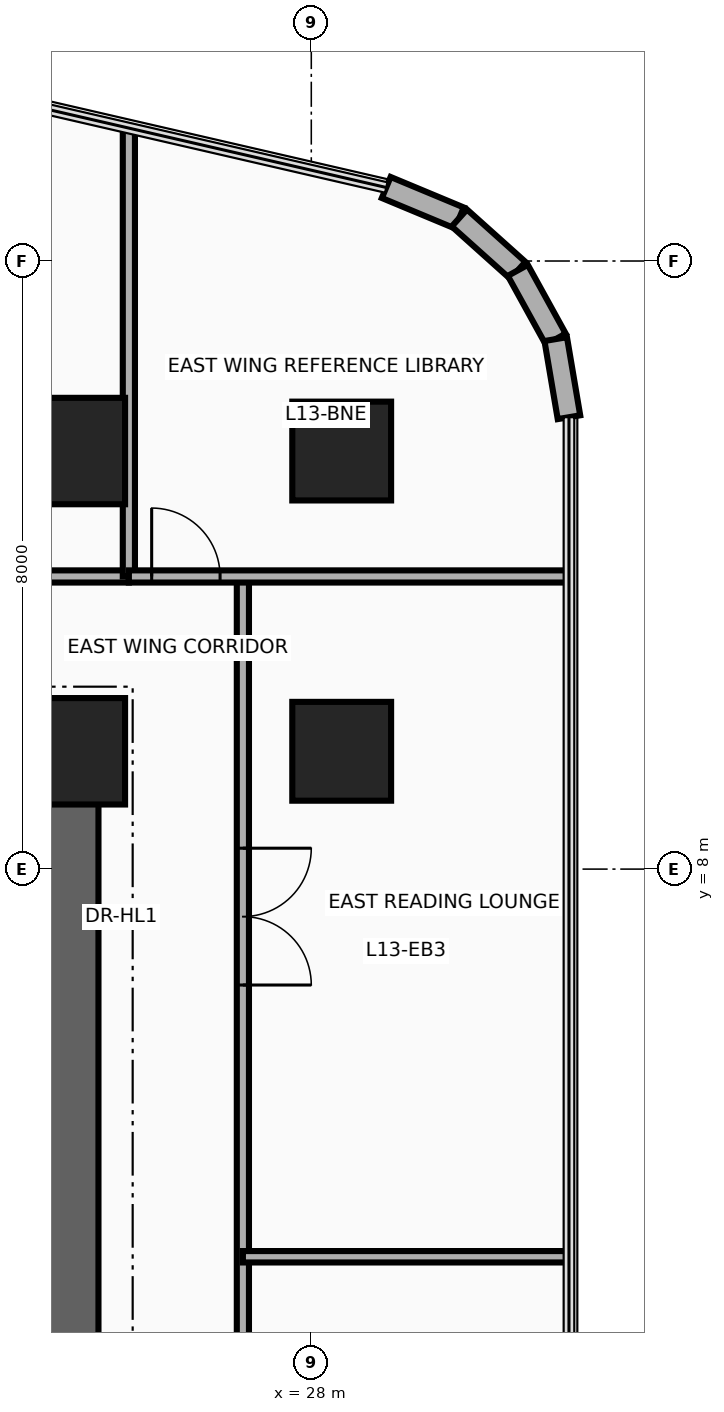
"""IFC4 building model, lengths in metres.
Left out: names, types, materials, properties, quantities, classifications, styles, units other than length and angle.
Written with IfcOpenShell. Run it as: python <this file> out.ifc"""

import sys

from ifc_helpers import new_model, si_unit, direction, frame, frame_2d, origin, origin_2d, place, context, subcontext, project, spatial, rectangle, circle, extrude, source, transform, mapped, element, fill, save


model = new_model("IFC4")
c1 = context("Model", 3, precision=1e-05, world=origin(), true_north=direction((0.0, 1.0)))
c2 = subcontext(c1, "Body", "Model", "MODEL_VIEW")
j1 = project(units=[si_unit("LENGTHUNIT", "METRE"), si_unit("PLANEANGLEUNIT", "RADIAN")], contexts=[c1])
p1 = place(None, origin())
s1 = spatial("IfcSite", under=j1, at=p1, CompositionType="ELEMENT")
p2 = place(p1, origin())
s2 = spatial("IfcBuilding", under=s1, at=p2, CompositionType="ELEMENT")
p3 = place(p2, frame((0.0, 0.0, 55.6)))
s3 = spatial("IfcBuildingStorey", under=s2, at=p3, CompositionType="ELEMENT", Elevation=55.6)
p4 = place(p3, frame((24.85, 0.95, 0.0), z_axis=(0.0, 0.0, 1.0), x_axis=(0.0, 1.0, 0.0)))
e1 = element("IfcWall", 1, at=p4, inside=s3, PredefinedType="SHEAR", context=c2, shape_type="SweptSolid", body=[
    extrude(rectangle(XDim=8.95, YDim=0.7, at=frame_2d((4.475, 0.0))), origin(), (0.0, 0.0, 1.0), 3.46),
])
p5 = place(p3, frame((15.85, 9.55, 0.0), z_axis=(0.0, 0.0, 1.0), x_axis=(1.0, 0.0, 0.0)))
e2 = element("IfcWall", 2, at=p5, inside=s3, PredefinedType="SHEAR", context=c2, shape_type="SweptSolid", body=[
    extrude(rectangle(XDim=9.0, YDim=0.7, at=frame_2d((4.5, 0.0))), origin(), (0.0, 0.0, 1.0), 3.46),
])
m1 = source(origin(), c2, "Body", "SweptSolid", [
    extrude(rectangle(XDim=1.4, YDim=1.4, at=origin_2d()), origin(), (0.0, 0.0, 1.0), 3.7),
])
p6 = place(p3, frame((24.85, 9.55, 0.0), z_axis=(0.0, 0.0, 1.0), x_axis=(1.0, 0.0, 0.0)))
e3 = element("IfcColumn", 3, at=p6, inside=s3, PredefinedType="COLUMN", context=c2, shape_type="MappedRepresentation", body=[
    mapped(m1, transform((0.0, 0.0, 0.0), x_axis=(1.0, 0.0, 0.0), y_axis=(0.0, 1.0, 0.0), z_axis=(0.0, 0.0, 1.0), scale=1.0)),
])
m2 = source(origin(), c2, "Body", "SweptSolid", [
    extrude(circle(Radius=0.65, at=origin_2d()), origin(), (0.0, 0.0, 1.0), 3.7),
])
p7 = place(p3, frame((28.4, 9.55, 0.0), z_axis=(0.0, 0.0, 1.0), x_axis=(1.0, 0.0, 0.0)))
e4 = element("IfcColumn", 4, at=p7, inside=s3, PredefinedType="COLUMN", context=c2, shape_type="MappedRepresentation", body=[
    mapped(m2, transform((0.0, 0.0, 0.0), x_axis=(1.0, 0.0, 0.0), y_axis=(0.0, 1.0, 0.0), z_axis=(0.0, 0.0, 1.0), scale=1.0)),
])
p8 = place(p3, frame((24.85, 13.5, 0.0), z_axis=(0.0, 0.0, 1.0), x_axis=(1.0, 0.0, 0.0)))
e5 = element("IfcColumn", 5, at=p8, inside=s3, PredefinedType="COLUMN", context=c2, shape_type="MappedRepresentation", body=[
    mapped(m1, transform((0.0, 0.0, 0.0), x_axis=(1.0, 0.0, 0.0), y_axis=(0.0, 1.0, 0.0), z_axis=(0.0, 0.0, 1.0), scale=1.0)),
])
p9 = place(p3, frame((28.4, 13.5, 0.0), z_axis=(0.0, 0.0, 1.0), x_axis=(1.0, 0.0, 0.0)))
e6 = element("IfcColumn", 6, at=p9, inside=s3, PredefinedType="COLUMN", context=c2, shape_type="MappedRepresentation", body=[
    mapped(m2, transform((0.0, 0.0, 0.0), x_axis=(1.0, 0.0, 0.0), y_axis=(0.0, 1.0, 0.0), z_axis=(0.0, 0.0, 1.0), scale=1.0)),
])
p10 = place(p3, frame((28.986, 16.967, 0.0), z_axis=(0.0, 0.0, 1.0), x_axis=(0.923083852684, -0.384598753136, 0.0)))
e7 = element("IfcWall", 7, at=p10, inside=s3, PredefinedType="SOLIDWALL", context=c2, shape_type="SweptSolid", body=[
    extrude(rectangle(XDim=1.042, YDim=0.3, at=frame_2d((0.521, 0.0))), origin(), (0.0, 0.0, 1.0), 3.46),
])
p11 = place(p3, frame((29.948, 16.566, 0.0), z_axis=(0.0, 0.0, 1.0), x_axis=(0.744585645533, -0.66752694063, 0.0)))
e8 = element("IfcWall", 8, at=p11, inside=s3, PredefinedType="SOLIDWALL", context=c2, shape_type="SweptSolid", body=[
    extrude(rectangle(XDim=1.033, YDim=0.3, at=frame_2d((0.517, 0.0))), origin(), (0.0, 0.0, 1.0), 3.46),
])
p12 = place(p3, frame((30.717, 15.877, 0.0), z_axis=(0.0, 0.0, 1.0), x_axis=(0.482971098131, -0.875636293429, 0.0)))
e9 = element("IfcWall", 9, at=p12, inside=s3, PredefinedType="SOLIDWALL", context=c2, shape_type="SweptSolid", body=[
    extrude(rectangle(XDim=1.033, YDim=0.3, at=frame_2d((0.516, 0.0))), origin(), (0.0, 0.0, 1.0), 3.46),
])
p13 = place(p3, frame((31.216, 14.973, 0.0), z_axis=(0.0, 0.0, 1.0), x_axis=(0.167019462117, -0.985953598946, 0.0)))
e10 = element("IfcWall", 10, at=p13, inside=s3, PredefinedType="SOLIDWALL", context=c2, shape_type="SweptSolid", body=[
    extrude(rectangle(XDim=1.042, YDim=0.3, at=frame_2d((0.521, 0.0))), origin(), (0.0, 0.0, 1.0), 3.46),
])
p14 = place(p3, frame((15.4, 11.85, 0.0), z_axis=(0.0, 0.0, 1.0), x_axis=(1.0, 0.0, 0.0)))
e11 = element("IfcWall", 11, at=p14, inside=s3, PredefinedType="PARTITIONING", context=c2, shape_type="SweptSolid", body=[
    extrude(rectangle(XDim=10.2, YDim=0.16, at=frame_2d((5.1, 0.0))), origin(), (0.0, 0.0, 1.0), 2.834),
])
p15 = place(p14, frame((4.65, 0.0, 0.0)))
e12 = element("IfcOpeningElement", 12, at=p15, cuts=e11, PredefinedType="OPENING", context=c2, shape_type="SweptSolid", body=[
    extrude(rectangle(XDim=0.9, YDim=2.1, at=frame_2d((0.45, 1.05))), frame((0.0, 0.095, 0.0), z_axis=(0.0, -1.0, 0.0), x_axis=(1.0, 0.0, 0.0)), (0.0, 0.0, 1.0), 0.19),
])
p16 = place(p3, frame((25.6, 11.85, 0.0), z_axis=(0.0, 0.0, 1.0), x_axis=(0.0, 1.0, 0.0)))
e13 = element("IfcWall", 13, at=p16, inside=s3, PredefinedType="PARTITIONING", context=c2, shape_type="SweptSolid", body=[
    extrude(rectangle(XDim=5.898, YDim=0.16, at=frame_2d((2.949, 0.0))), origin(), (0.0, 0.0, 1.0), 2.583),
])
p17 = place(p3, frame((27.1, -13.89, 0.0), z_axis=(0.0, 0.0, 1.0), x_axis=(0.0, 1.0, 0.0)))
e14 = element("IfcWall", 14, at=p17, inside=s3, PredefinedType="PARTITIONING", context=c2, shape_type="SweptSolid", body=[
    extrude(rectangle(XDim=25.74, YDim=0.16, at=frame_2d((12.87, 0.0))), origin(), (0.0, 0.0, 1.0), 2.583),
])
p18 = place(p17, frame((1.76, 0.0, 0.0)))
e15 = element("IfcOpeningElement", 15, at=p18, cuts=e14, PredefinedType="OPENING", context=c2, shape_type="SweptSolid", body=[
    extrude(rectangle(XDim=1.8, YDim=2.15, at=frame_2d((0.9, 1.075))), frame((0.0, 0.095, 0.0), z_axis=(0.0, -1.0, 0.0), x_axis=(1.0, 0.0, 0.0)), (0.0, 0.0, 1.0), 0.19),
])
p19 = place(p17, frame((12.16, 0.0, 0.0)))
e16 = element("IfcOpeningElement", 16, at=p19, cuts=e14, PredefinedType="OPENING", context=c2, shape_type="SweptSolid", body=[
    extrude(rectangle(XDim=1.8, YDim=2.15, at=frame_2d((0.9, 1.075))), frame((0.0, 0.095, 0.0), z_axis=(0.0, -1.0, 0.0), x_axis=(1.0, 0.0, 0.0)), (0.0, 0.0, 1.0), 0.19),
])
p20 = place(p17, frame((20.365, 0.0, 0.0)))
e17 = element("IfcOpeningElement", 17, at=p20, cuts=e14, PredefinedType="OPENING", context=c2, shape_type="SweptSolid", body=[
    extrude(rectangle(XDim=1.8, YDim=2.15, at=frame_2d((0.9, 1.075))), frame((0.0, 0.095, 0.0), z_axis=(0.0, -1.0, 0.0), x_axis=(1.0, 0.0, 0.0)), (0.0, 0.0, 1.0), 0.19),
])
p21 = place(p3, frame((25.6, 11.85, 0.0), z_axis=(0.0, 0.0, 1.0), x_axis=(1.0, 0.0, 0.0)))
e18 = element("IfcWall", 18, at=p21, inside=s3, PredefinedType="PARTITIONING", context=c2, shape_type="SweptSolid", body=[
    extrude(rectangle(XDim=5.79, YDim=0.16, at=frame_2d((2.895, 0.0))), origin(), (0.0, 0.0, 1.0), 2.896),
])
p22 = place(p21, frame((0.3, 0.0, 0.0)))
e19 = element("IfcOpeningElement", 19, at=p22, cuts=e18, PredefinedType="OPENING", context=c2, shape_type="SweptSolid", body=[
    extrude(rectangle(XDim=0.9, YDim=2.1, at=frame_2d((0.45, 1.05))), frame((0.0, 0.095, 0.0), z_axis=(0.0, -1.0, 0.0), x_axis=(1.0, 0.0, 0.0)), (0.0, 0.0, 1.0), 0.19),
])
p23 = place(p3, frame((27.1, 2.9, 0.0), z_axis=(0.0, 0.0, 1.0), x_axis=(1.0, 0.0, 0.0)))
e20 = element("IfcWall", 20, at=p23, inside=s3, PredefinedType="PARTITIONING", context=c2, shape_type="SweptSolid", body=[
    extrude(rectangle(XDim=4.29, YDim=0.15, at=frame_2d((2.145, 0.0))), origin(), (0.0, 0.0, 1.0), 2.896),
])
p24 = place(p22, origin())
e21 = element("IfcDoor", 21, at=p24, inside=s3, OperationType="SINGLE_SWING_RIGHT", PredefinedType="DOOR", context=c2, shape_type="SweptSolid", body=[
    extrude(rectangle(XDim=0.9, YDim=2.1, at=frame_2d((0.45, 1.05))), frame((0.0, 0.025, 0.0), z_axis=(0.0, -1.0, 0.0), x_axis=(1.0, 0.0, 0.0)), (0.0, 0.0, 1.0), 0.05),
])
fill(e19, e21)
p25 = place(p20, frame((1.8, 0.0, 0.0), z_axis=(0.0, 0.0, 1.0), x_axis=(-1.0, 0.0, 0.0)))
e22 = element("IfcDoor", 22, at=p25, inside=s3, OperationType="DOUBLE_DOOR_SINGLE_SWING", PredefinedType="DOOR", context=c2, shape_type="SweptSolid", body=[
    extrude(rectangle(XDim=1.8, YDim=2.15, at=frame_2d((0.9, 1.075))), frame((0.0, 0.025, 0.0), z_axis=(0.0, -1.0, 0.0), x_axis=(1.0, 0.0, 0.0)), (0.0, 0.0, 1.0), 0.05),
])
fill(e17, e22)
save(model, sys.argv[1])
